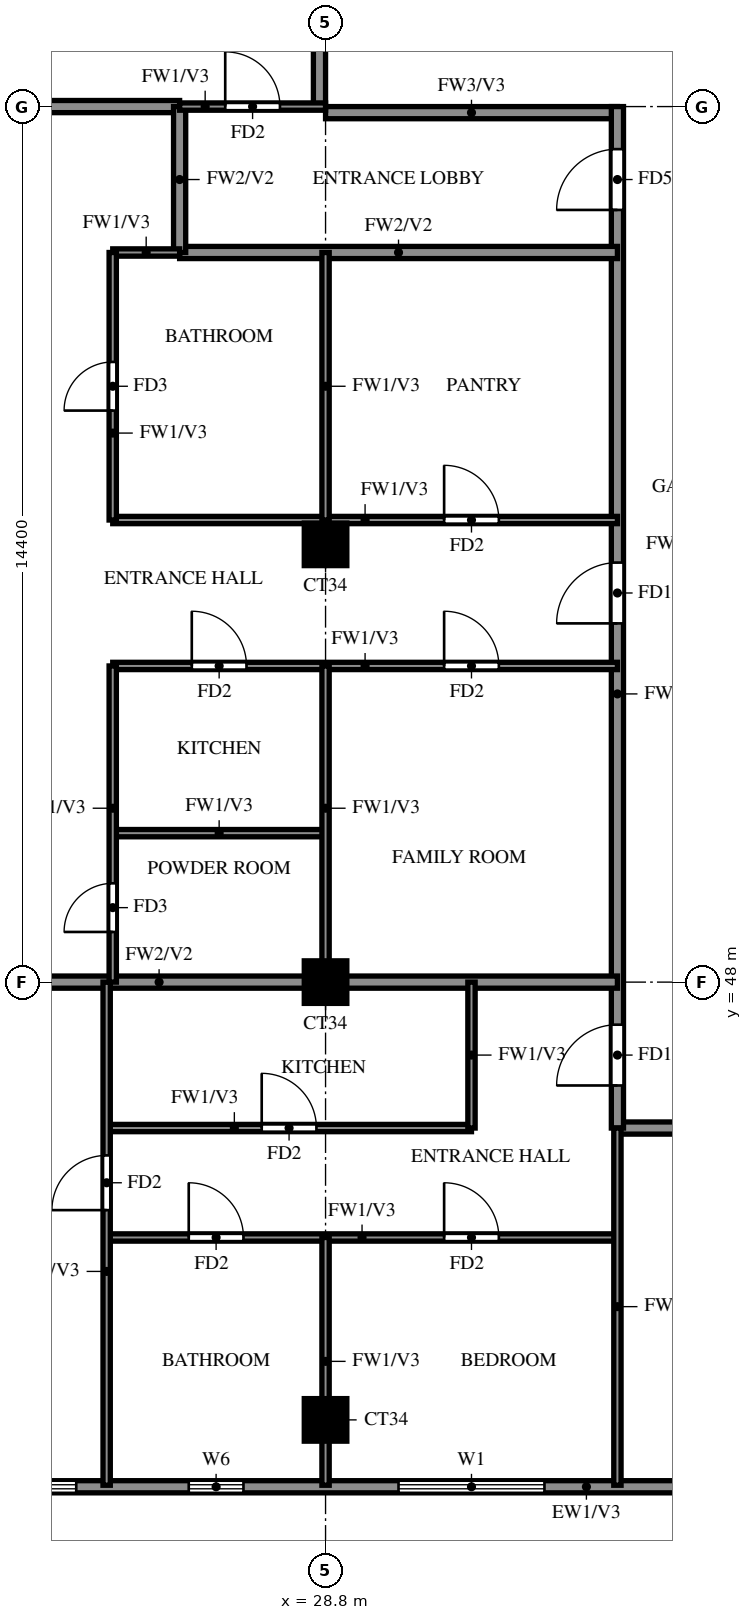
"""IFC4 building model, lengths in metres.
Left out: names, types, materials, properties, quantities, classifications, styles, units other than length and angle.
Written with IfcOpenShell. Run it as: python <this file> out.ifc"""

import sys

from ifc_helpers import new_model, si_unit, direction, frame, frame_2d, origin, origin_2d, place, context, subcontext, project, spatial, rectangle, extrude, source, transform, mapped, element, fill, save


model = new_model("IFC4")
c1 = context("Model", 3, precision=1e-05, world=origin(), true_north=direction((0.0, 1.0)))
c2 = subcontext(c1, "Body", "Model", "MODEL_VIEW")
j1 = project(units=[si_unit("LENGTHUNIT", "METRE"), si_unit("PLANEANGLEUNIT", "RADIAN")], contexts=[c1])
p1 = place(None, origin())
s1 = spatial("IfcSite", under=j1, at=p1, CompositionType="ELEMENT")
p2 = place(p1, origin())
s2 = spatial("IfcBuilding", under=s1, at=p2, CompositionType="ELEMENT")
p3 = place(p2, frame((0.0, 0.0, 264.0)))
s3 = spatial("IfcBuildingStorey", under=s2, at=p3, CompositionType="ELEMENT", Elevation=264.0)
m1 = source(origin(), c2, "Body", "SweptSolid", [
    extrude(rectangle(XDim=0.7, YDim=0.7, at=origin_2d()), origin(), (0.0, 0.0, 1.0), 3.22),
])
for number, where, z_axis, x_axis in (
    (1, (28.8, 40.8, 0.0), (0.0, 0.0, 1.0), (1.0, 0.0, 0.0)),
    (2, (28.8, 48.0, 0.0), (0.0, 0.0, 1.0), (1.0, 0.0, 0.0)),
    (3, (28.8, 55.2, 0.0), (0.0, 0.0, 1.0), (1.0, 0.0, 0.0)),
):
    element("IfcColumn", number, at=place(p3, frame(where, z_axis=z_axis, x_axis=x_axis)), inside=s3, PredefinedType="COLUMN", context=c2, shape_type="MappedRepresentation", body=[
        mapped(m1, transform((0.0, 0.0, 0.0))),
    ])
p4 = place(p3, frame((22.2, 39.7, 0.0), z_axis=(0.0, 0.0, 1.0), x_axis=(1.0, 0.0, 0.0)))
e4 = element("IfcWall", 4, at=p4, inside=s3, PredefinedType="SOLIDWALL", context=c2, shape_type="SweptSolid", body=[
    extrude(rectangle(XDim=19.8, YDim=0.2, at=frame_2d((9.9, 0.0))), origin(), (0.0, 0.0, 1.0), 3.22),
])
p5 = place(p4, frame((0.7, 0.0, 0.6)))
e5 = element("IfcOpeningElement", 5, at=p5, cuts=e4, PredefinedType="OPENING", context=c2, shape_type="SweptSolid", body=[
    extrude(rectangle(XDim=1.8, YDim=2.4, at=frame_2d((0.9, 1.2))), frame((0.0, 0.11, 0.0), z_axis=(0.0, -1.0, 0.0), x_axis=(1.0, 0.0, 0.0)), (0.0, 0.0, 1.0), 0.22),
])
p6 = place(p4, frame((4.35, 0.0, 1.5)))
e6 = element("IfcOpeningElement", 6, at=p6, cuts=e4, PredefinedType="OPENING", context=c2, shape_type="SweptSolid", body=[
    extrude(rectangle(XDim=0.9, YDim=0.9, at=frame_2d((0.45, 0.45))), frame((0.0, 0.11, 0.0), z_axis=(0.0, -1.0, 0.0), x_axis=(1.0, 0.0, 0.0)), (0.0, 0.0, 1.0), 0.22),
])
p7 = place(p4, frame((7.8, 0.0, 0.6)))
e7 = element("IfcOpeningElement", 7, at=p7, cuts=e4, PredefinedType="OPENING", context=c2, shape_type="SweptSolid", body=[
    extrude(rectangle(XDim=2.4, YDim=2.4, at=frame_2d((1.2, 1.2))), frame((0.0, 0.11, 0.0), z_axis=(0.0, -1.0, 0.0), x_axis=(1.0, 0.0, 0.0)), (0.0, 0.0, 1.0), 0.22),
])
p8 = place(p3, frame((33.6, 45.6, 0.0), z_axis=(0.0, 0.0, 1.0), x_axis=(1.0, 0.0, 0.0)))
e8 = element("IfcWall", 8, at=p8, inside=s3, PredefinedType="SOLIDWALL", context=c2, shape_type="SweptSolid", body=[
    extrude(rectangle(XDim=7.2, YDim=0.2, at=frame_2d((3.6, 0.0))), origin(), (0.0, 0.0, 1.0), 3.22),
])
p9 = place(p8, frame((3.15, 0.0, 0.0)))
e9 = element("IfcOpeningElement", 9, at=p9, cuts=e8, PredefinedType="OPENING", context=c2, shape_type="SweptSolid", body=[
    extrude(rectangle(XDim=0.9, YDim=2.1, at=frame_2d((0.45, 1.05))), frame((0.0, 0.11, 0.0), z_axis=(0.0, -1.0, 0.0), x_axis=(1.0, 0.0, 0.0)), (0.0, 0.0, 1.0), 0.22),
])
p10 = place(p3, frame((28.8, 62.3, 0.0), z_axis=(0.0, 0.0, 1.0), x_axis=(1.0, 0.0, 0.0)))
e10 = element("IfcWall", 10, at=p10, inside=s3, PredefinedType="SOLIDWALL", context=c2, shape_type="SweptSolid", body=[
    extrude(rectangle(XDim=4.8, YDim=0.2, at=frame_2d((2.4, 0.0))), origin(), (0.0, 0.0, 1.0), 3.22),
])
p11 = place(p3, frame((28.7, 62.4, 0.0), z_axis=(0.0, 0.0, 1.0), x_axis=(0.0, 1.0, 0.0)))
e11 = element("IfcWall", 11, at=p11, inside=s3, PredefinedType="SOLIDWALL", context=c2, shape_type="SweptSolid", body=[
    extrude(rectangle(XDim=15.6, YDim=0.2, at=frame_2d((7.8, 0.0))), origin(), (0.0, 0.0, 1.0), 3.22),
])
p12 = place(p3, frame((33.6, 45.6, 0.0), z_axis=(0.0, 0.0, 1.0), x_axis=(0.0, 1.0, 0.0)))
e12 = element("IfcWall", 12, at=p12, inside=s3, PredefinedType="SOLIDWALL", context=c2, shape_type="SweptSolid", body=[
    extrude(rectangle(XDim=16.8, YDim=0.2, at=frame_2d((8.4, 0.0))), origin(), (0.0, 0.0, 1.0), 3.22),
])
p13 = place(p12, frame((0.7, 0.0, 0.0)))
e13 = element("IfcOpeningElement", 13, at=p13, cuts=e12, PredefinedType="OPENING", context=c2, shape_type="SweptSolid", body=[
    extrude(rectangle(XDim=1.0, YDim=2.1, at=frame_2d((0.5, 1.05))), frame((0.0, 0.11, 0.0), z_axis=(0.0, -1.0, 0.0), x_axis=(1.0, 0.0, 0.0)), (0.0, 0.0, 1.0), 0.22),
])
p14 = place(p12, frame((8.3, 0.0, 0.0)))
e14 = element("IfcOpeningElement", 14, at=p14, cuts=e12, PredefinedType="OPENING", context=c2, shape_type="SweptSolid", body=[
    extrude(rectangle(XDim=1.0, YDim=2.1, at=frame_2d((0.5, 1.05))), frame((0.0, 0.11, 0.0), z_axis=(0.0, -1.0, 0.0), x_axis=(1.0, 0.0, 0.0)), (0.0, 0.0, 1.0), 0.22),
])
p15 = place(p12, frame((15.1, 0.0, 0.0)))
e15 = element("IfcOpeningElement", 15, at=p15, cuts=e12, PredefinedType="OPENING", context=c2, shape_type="SweptSolid", body=[
    extrude(rectangle(XDim=1.0, YDim=2.1, at=frame_2d((0.5, 1.05))), frame((0.0, 0.11, 0.0), z_axis=(0.0, -1.0, 0.0), x_axis=(1.0, 0.0, 0.0)), (0.0, 0.0, 1.0), 0.22),
])
p16 = place(p3, frame((18.525, 48.0, 0.0), z_axis=(0.0, 0.0, 1.0), x_axis=(1.0, 0.0, 0.0)))
e16 = element("IfcWall", 16, at=p16, inside=s3, PredefinedType="SOLIDWALL", context=c2, shape_type="SweptSolid", body=[
    extrude(rectangle(XDim=15.075, YDim=0.2, at=frame_2d((7.538, 0.0))), origin(), (0.0, 0.0, 1.0), 3.22),
])
p17 = place(p3, frame((26.4, 60.0, 0.0), z_axis=(0.0, 0.0, 1.0), x_axis=(1.0, 0.0, 0.0)))
e17 = element("IfcWall", 17, at=p17, inside=s3, PredefinedType="SOLIDWALL", context=c2, shape_type="SweptSolid", body=[
    extrude(rectangle(XDim=7.2, YDim=0.2, at=frame_2d((3.6, 0.0))), origin(), (0.0, 0.0, 1.0), 3.22),
])
p18 = place(p3, frame((18.525, 62.4, 0.0), z_axis=(0.0, 0.0, 1.0), x_axis=(1.0, 0.0, 0.0)))
e18 = element("IfcWall", 18, at=p18, inside=s3, PredefinedType="SOLIDWALL", context=c2, shape_type="SweptSolid", body=[
    extrude(rectangle(XDim=7.875, YDim=0.2, at=frame_2d((3.938, 0.0))), origin(), (0.0, 0.0, 1.0), 3.22),
])
p19 = place(p3, frame((26.4, 60.0, 0.0), z_axis=(0.0, 0.0, 1.0), x_axis=(0.0, 1.0, 0.0)))
e19 = element("IfcWall", 19, at=p19, inside=s3, PredefinedType="SOLIDWALL", context=c2, shape_type="SweptSolid", body=[
    extrude(rectangle(XDim=2.4, YDim=0.2, at=frame_2d((1.2, 0.0))), origin(), (0.0, 0.0, 1.0), 3.22),
])
p20 = place(p3, frame((25.2, 43.8, 0.0), z_axis=(0.0, 0.0, 1.0), x_axis=(1.0, 0.0, 0.0)))
e20 = element("IfcWall", 20, at=p20, inside=s3, PredefinedType="PARTITIONING", context=c2, shape_type="SweptSolid", body=[
    extrude(rectangle(XDim=8.4, YDim=0.12, at=frame_2d((4.2, 0.0))), origin(), (0.0, 0.0, 1.0), 3.22),
])
p21 = place(p20, frame((1.35, 0.0, 0.0)))
e21 = element("IfcOpeningElement", 21, at=p21, cuts=e20, PredefinedType="OPENING", context=c2, shape_type="SweptSolid", body=[
    extrude(rectangle(XDim=0.9, YDim=2.1, at=frame_2d((0.45, 1.05))), frame((0.0, 0.07, 0.0), z_axis=(0.0, -1.0, 0.0), x_axis=(1.0, 0.0, 0.0)), (0.0, 0.0, 1.0), 0.14),
])
p22 = place(p20, frame((5.55, 0.0, 0.0)))
e22 = element("IfcOpeningElement", 22, at=p22, cuts=e20, PredefinedType="OPENING", context=c2, shape_type="SweptSolid", body=[
    extrude(rectangle(XDim=0.9, YDim=2.1, at=frame_2d((0.45, 1.05))), frame((0.0, 0.07, 0.0), z_axis=(0.0, -1.0, 0.0), x_axis=(1.0, 0.0, 0.0)), (0.0, 0.0, 1.0), 0.14),
])
p23 = place(p3, frame((25.2, 45.6, 0.0), z_axis=(0.0, 0.0, 1.0), x_axis=(1.0, 0.0, 0.0)))
e23 = element("IfcWall", 23, at=p23, inside=s3, PredefinedType="PARTITIONING", context=c2, shape_type="SweptSolid", body=[
    extrude(rectangle(XDim=6.0, YDim=0.12, at=frame_2d((3.0, 0.0))), origin(), (0.0, 0.0, 1.0), 3.22),
])
p24 = place(p23, frame((2.55, 0.0, 0.0)))
e24 = element("IfcOpeningElement", 24, at=p24, cuts=e23, PredefinedType="OPENING", context=c2, shape_type="SweptSolid", body=[
    extrude(rectangle(XDim=0.9, YDim=2.1, at=frame_2d((0.45, 1.05))), frame((0.0, 0.07, 0.0), z_axis=(0.0, -1.0, 0.0), x_axis=(1.0, 0.0, 0.0)), (0.0, 0.0, 1.0), 0.14),
])
p25 = place(p3, frame((25.3, 50.45, 0.0), z_axis=(0.0, 0.0, 1.0), x_axis=(1.0, 0.0, 0.0)))
e25 = element("IfcWall", 25, at=p25, inside=s3, PredefinedType="PARTITIONING", context=c2, shape_type="SweptSolid", body=[
    extrude(rectangle(XDim=3.5, YDim=0.12, at=frame_2d((1.75, 0.0))), origin(), (0.0, 0.0, 1.0), 3.22),
])
p26 = place(p3, frame((25.3, 53.2, 0.0), z_axis=(0.0, 0.0, 1.0), x_axis=(1.0, 0.0, 0.0)))
e26 = element("IfcWall", 26, at=p26, inside=s3, PredefinedType="PARTITIONING", context=c2, shape_type="SweptSolid", body=[
    extrude(rectangle(XDim=8.3, YDim=0.12, at=frame_2d((4.15, 0.0))), origin(), (0.0, 0.0, 1.0), 3.22),
])
p27 = place(p26, frame((1.3, 0.0, 0.0)))
e27 = element("IfcOpeningElement", 27, at=p27, cuts=e26, PredefinedType="OPENING", context=c2, shape_type="SweptSolid", body=[
    extrude(rectangle(XDim=0.9, YDim=2.1, at=frame_2d((0.45, 1.05))), frame((0.0, 0.07, 0.0), z_axis=(0.0, -1.0, 0.0), x_axis=(1.0, 0.0, 0.0)), (0.0, 0.0, 1.0), 0.14),
])
p28 = place(p26, frame((5.45, 0.0, 0.0)))
e28 = element("IfcOpeningElement", 28, at=p28, cuts=e26, PredefinedType="OPENING", context=c2, shape_type="SweptSolid", body=[
    extrude(rectangle(XDim=0.9, YDim=2.1, at=frame_2d((0.45, 1.05))), frame((0.0, 0.07, 0.0), z_axis=(0.0, -1.0, 0.0), x_axis=(1.0, 0.0, 0.0)), (0.0, 0.0, 1.0), 0.14),
])
p29 = place(p3, frame((25.3, 55.6, 0.0), z_axis=(0.0, 0.0, 1.0), x_axis=(1.0, 0.0, 0.0)))
e29 = element("IfcWall", 29, at=p29, inside=s3, PredefinedType="PARTITIONING", context=c2, shape_type="SweptSolid", body=[
    extrude(rectangle(XDim=8.3, YDim=0.12, at=frame_2d((4.15, 0.0))), origin(), (0.0, 0.0, 1.0), 3.22),
])
p30 = place(p29, frame((5.45, 0.0, 0.0)))
e30 = element("IfcOpeningElement", 30, at=p30, cuts=e29, PredefinedType="OPENING", context=c2, shape_type="SweptSolid", body=[
    extrude(rectangle(XDim=0.9, YDim=2.1, at=frame_2d((0.45, 1.05))), frame((0.0, 0.07, 0.0), z_axis=(0.0, -1.0, 0.0), x_axis=(1.0, 0.0, 0.0)), (0.0, 0.0, 1.0), 0.14),
])
p31 = place(p3, frame((25.3, 60.0, 0.0), z_axis=(0.0, 0.0, 1.0), x_axis=(1.0, 0.0, 0.0)))
e31 = element("IfcWall", 31, at=p31, inside=s3, PredefinedType="PARTITIONING", context=c2, shape_type="SweptSolid", body=[
    extrude(rectangle(XDim=1.1, YDim=0.12, at=frame_2d((0.55, 0.0))), origin(), (0.0, 0.0, 1.0), 3.22),
])
p32 = place(p3, frame((26.4, 62.4, 0.0), z_axis=(0.0, 0.0, 1.0), x_axis=(1.0, 0.0, 0.0)))
e32 = element("IfcWall", 32, at=p32, inside=s3, PredefinedType="PARTITIONING", context=c2, shape_type="SweptSolid", body=[
    extrude(rectangle(XDim=2.4, YDim=0.12, at=frame_2d((1.2, 0.0))), origin(), (0.0, 0.0, 1.0), 3.22),
])
p33 = place(p32, frame((0.75, 0.0, 0.0)))
e33 = element("IfcOpeningElement", 33, at=p33, cuts=e32, PredefinedType="OPENING", context=c2, shape_type="SweptSolid", body=[
    extrude(rectangle(XDim=0.9, YDim=2.1, at=frame_2d((0.45, 1.05))), frame((0.0, 0.07, 0.0), z_axis=(0.0, -1.0, 0.0), x_axis=(1.0, 0.0, 0.0)), (0.0, 0.0, 1.0), 0.14),
])
p34 = place(p3, frame((25.2, 39.725, 0.0), z_axis=(0.0, 0.0, 1.0), x_axis=(0.0, 1.0, 0.0)))
e34 = element("IfcWall", 34, at=p34, inside=s3, PredefinedType="PARTITIONING", context=c2, shape_type="SweptSolid", body=[
    extrude(rectangle(XDim=8.275, YDim=0.12, at=frame_2d((4.137, 0.0))), origin(), (0.0, 0.0, 1.0), 3.22),
])
p35 = place(p34, frame((4.525, 0.0, 0.0)))
e35 = element("IfcOpeningElement", 35, at=p35, cuts=e34, PredefinedType="OPENING", context=c2, shape_type="SweptSolid", body=[
    extrude(rectangle(XDim=0.9, YDim=2.1, at=frame_2d((0.45, 1.05))), frame((0.0, 0.07, 0.0), z_axis=(0.0, -1.0, 0.0), x_axis=(1.0, 0.0, 0.0)), (0.0, 0.0, 1.0), 0.14),
])
p36 = place(p3, frame((25.3, 48.0, 0.0), z_axis=(0.0, 0.0, 1.0), x_axis=(0.0, 1.0, 0.0)))
e36 = element("IfcWall", 36, at=p36, inside=s3, PredefinedType="PARTITIONING", context=c2, shape_type="SweptSolid", body=[
    extrude(rectangle(XDim=5.2, YDim=0.12, at=frame_2d((2.6, 0.0))), origin(), (0.0, 0.0, 1.0), 3.22),
])
p37 = place(p36, frame((0.825, 0.0, 0.0)))
e37 = element("IfcOpeningElement", 37, at=p37, cuts=e36, PredefinedType="OPENING", context=c2, shape_type="SweptSolid", body=[
    extrude(rectangle(XDim=0.8, YDim=2.1, at=frame_2d((0.4, 1.05))), frame((0.0, 0.07, 0.0), z_axis=(0.0, -1.0, 0.0), x_axis=(1.0, 0.0, 0.0)), (0.0, 0.0, 1.0), 0.14),
])
p38 = place(p3, frame((25.3, 55.6, 0.0), z_axis=(0.0, 0.0, 1.0), x_axis=(0.0, 1.0, 0.0)))
e38 = element("IfcWall", 38, at=p38, inside=s3, PredefinedType="PARTITIONING", context=c2, shape_type="SweptSolid", body=[
    extrude(rectangle(XDim=4.4, YDim=0.12, at=frame_2d((2.2, 0.0))), origin(), (0.0, 0.0, 1.0), 3.22),
])
p39 = place(p38, frame((1.8, 0.0, 0.0)))
e39 = element("IfcOpeningElement", 39, at=p39, cuts=e38, PredefinedType="OPENING", context=c2, shape_type="SweptSolid", body=[
    extrude(rectangle(XDim=0.8, YDim=2.1, at=frame_2d((0.4, 1.05))), frame((0.0, 0.07, 0.0), z_axis=(0.0, -1.0, 0.0), x_axis=(1.0, 0.0, 0.0)), (0.0, 0.0, 1.0), 0.14),
])
p40 = place(p3, frame((28.8, 39.725, 0.0), z_axis=(0.0, 0.0, 1.0), x_axis=(0.0, 1.0, 0.0)))
e40 = element("IfcWall", 40, at=p40, inside=s3, PredefinedType="PARTITIONING", context=c2, shape_type="SweptSolid", body=[
    extrude(rectangle(XDim=4.075, YDim=0.12, at=frame_2d((2.038, 0.0))), origin(), (0.0, 0.0, 1.0), 3.22),
])
p41 = place(p3, frame((28.8, 48.0, 0.0), z_axis=(0.0, 0.0, 1.0), x_axis=(0.0, 1.0, 0.0)))
e41 = element("IfcWall", 41, at=p41, inside=s3, PredefinedType="PARTITIONING", context=c2, shape_type="SweptSolid", body=[
    extrude(rectangle(XDim=5.2, YDim=0.12, at=frame_2d((2.6, 0.0))), origin(), (0.0, 0.0, 1.0), 3.22),
])
p42 = place(p3, frame((28.8, 55.6, 0.0), z_axis=(0.0, 0.0, 1.0), x_axis=(0.0, 1.0, 0.0)))
e42 = element("IfcWall", 42, at=p42, inside=s3, PredefinedType="PARTITIONING", context=c2, shape_type="SweptSolid", body=[
    extrude(rectangle(XDim=4.4, YDim=0.12, at=frame_2d((2.2, 0.0))), origin(), (0.0, 0.0, 1.0), 3.22),
])
p43 = place(p3, frame((31.2, 45.6, 0.0), z_axis=(0.0, 0.0, 1.0), x_axis=(0.0, 1.0, 0.0)))
e43 = element("IfcWall", 43, at=p43, inside=s3, PredefinedType="PARTITIONING", context=c2, shape_type="SweptSolid", body=[
    extrude(rectangle(XDim=2.4, YDim=0.12, at=frame_2d((1.2, 0.0))), origin(), (0.0, 0.0, 1.0), 3.22),
])
p44 = place(p3, frame((33.6, 39.725, 0.0), z_axis=(0.0, 0.0, 1.0), x_axis=(0.0, 1.0, 0.0)))
e44 = element("IfcWall", 44, at=p44, inside=s3, PredefinedType="PARTITIONING", context=c2, shape_type="SweptSolid", body=[
    extrude(rectangle(XDim=5.875, YDim=0.12, at=frame_2d((2.938, 0.0))), origin(), (0.0, 0.0, 1.0), 3.22),
])
p45 = place(p5, origin())
e45 = element("IfcWindow", 45, at=p45, inside=s3, PartitioningType="DOUBLE_PANEL_VERTICAL", PredefinedType="WINDOW", context=c2, shape_type="SweptSolid", body=[
    extrude(rectangle(XDim=1.8, YDim=2.4, at=frame_2d((0.9, 1.2))), frame((0.0, 0.03, 0.0), z_axis=(0.0, -1.0, 0.0), x_axis=(1.0, 0.0, 0.0)), (0.0, 0.0, 1.0), 0.06),
])
fill(e5, e45)
p46 = place(p6, origin())
e46 = element("IfcWindow", 46, at=p46, inside=s3, PartitioningType="SINGLE_PANEL", PredefinedType="WINDOW", context=c2, shape_type="SweptSolid", body=[
    extrude(rectangle(XDim=0.9, YDim=0.9, at=frame_2d((0.45, 0.45))), frame((0.0, 0.03, 0.0), z_axis=(0.0, -1.0, 0.0), x_axis=(1.0, 0.0, 0.0)), (0.0, 0.0, 1.0), 0.06),
])
fill(e6, e46)
p47 = place(p7, origin())
e47 = element("IfcWindow", 47, at=p47, inside=s3, PartitioningType="DOUBLE_PANEL_VERTICAL", PredefinedType="WINDOW", context=c2, shape_type="SweptSolid", body=[
    extrude(rectangle(XDim=2.4, YDim=2.4, at=frame_2d((1.2, 1.2))), frame((0.0, 0.03, 0.0), z_axis=(0.0, -1.0, 0.0), x_axis=(1.0, 0.0, 0.0)), (0.0, 0.0, 1.0), 0.06),
])
fill(e7, e47)
p48 = place(p13, origin())
e48 = element("IfcDoor", 48, at=p48, inside=s3, OperationType="SINGLE_SWING_LEFT", PredefinedType="DOOR", context=c2, shape_type="SweptSolid", body=[
    extrude(rectangle(XDim=1.0, YDim=2.1, at=frame_2d((0.5, 1.05))), frame((0.0, 0.025, 0.0), z_axis=(0.0, -1.0, 0.0), x_axis=(1.0, 0.0, 0.0)), (0.0, 0.0, 1.0), 0.05),
])
fill(e13, e48)
p49 = place(p35, origin())
e49 = element("IfcDoor", 49, at=p49, inside=s3, OperationType="SINGLE_SWING_RIGHT", PredefinedType="DOOR", context=c2, shape_type="SweptSolid", body=[
    extrude(rectangle(XDim=0.9, YDim=2.1, at=frame_2d((0.45, 1.05))), frame((0.0, 0.025, 0.0), z_axis=(0.0, -1.0, 0.0), x_axis=(1.0, 0.0, 0.0)), (0.0, 0.0, 1.0), 0.05),
])
fill(e35, e49)
p50 = place(p21, origin())
e50 = element("IfcDoor", 50, at=p50, inside=s3, OperationType="SINGLE_SWING_LEFT", PredefinedType="DOOR", context=c2, shape_type="SweptSolid", body=[
    extrude(rectangle(XDim=0.9, YDim=2.1, at=frame_2d((0.45, 1.05))), frame((0.0, 0.025, 0.0), z_axis=(0.0, -1.0, 0.0), x_axis=(1.0, 0.0, 0.0)), (0.0, 0.0, 1.0), 0.05),
])
fill(e21, e50)
p51 = place(p22, origin())
e51 = element("IfcDoor", 51, at=p51, inside=s3, OperationType="SINGLE_SWING_LEFT", PredefinedType="DOOR", context=c2, shape_type="SweptSolid", body=[
    extrude(rectangle(XDim=0.9, YDim=2.1, at=frame_2d((0.45, 1.05))), frame((0.0, 0.025, 0.0), z_axis=(0.0, -1.0, 0.0), x_axis=(1.0, 0.0, 0.0)), (0.0, 0.0, 1.0), 0.05),
])
fill(e22, e51)
p52 = place(p24, origin())
e52 = element("IfcDoor", 52, at=p52, inside=s3, OperationType="SINGLE_SWING_RIGHT", PredefinedType="DOOR", context=c2, shape_type="SweptSolid", body=[
    extrude(rectangle(XDim=0.9, YDim=2.1, at=frame_2d((0.45, 1.05))), frame((0.0, 0.025, 0.0), z_axis=(0.0, -1.0, 0.0), x_axis=(1.0, 0.0, 0.0)), (0.0, 0.0, 1.0), 0.05),
])
fill(e24, e52)
p53 = place(p14, origin())
e53 = element("IfcDoor", 53, at=p53, inside=s3, OperationType="SINGLE_SWING_LEFT", PredefinedType="DOOR", context=c2, shape_type="SweptSolid", body=[
    extrude(rectangle(XDim=1.0, YDim=2.1, at=frame_2d((0.5, 1.05))), frame((0.0, 0.025, 0.0), z_axis=(0.0, -1.0, 0.0), x_axis=(1.0, 0.0, 0.0)), (0.0, 0.0, 1.0), 0.05),
])
fill(e14, e53)
p54 = place(p37, origin())
e54 = element("IfcDoor", 54, at=p54, inside=s3, OperationType="SINGLE_SWING_RIGHT", PredefinedType="DOOR", context=c2, shape_type="SweptSolid", body=[
    extrude(rectangle(XDim=0.8, YDim=2.1, at=frame_2d((0.4, 1.05))), frame((0.0, 0.025, 0.0), z_axis=(0.0, -1.0, 0.0), x_axis=(1.0, 0.0, 0.0)), (0.0, 0.0, 1.0), 0.05),
])
fill(e37, e54)
p55 = place(p27, origin())
e55 = element("IfcDoor", 55, at=p55, inside=s3, OperationType="SINGLE_SWING_LEFT", PredefinedType="DOOR", context=c2, shape_type="SweptSolid", body=[
    extrude(rectangle(XDim=0.9, YDim=2.1, at=frame_2d((0.45, 1.05))), frame((0.0, 0.025, 0.0), z_axis=(0.0, -1.0, 0.0), x_axis=(1.0, 0.0, 0.0)), (0.0, 0.0, 1.0), 0.05),
])
fill(e27, e55)
p56 = place(p39, origin())
e56 = element("IfcDoor", 56, at=p56, inside=s3, OperationType="SINGLE_SWING_LEFT", PredefinedType="DOOR", context=c2, shape_type="SweptSolid", body=[
    extrude(rectangle(XDim=0.8, YDim=2.1, at=frame_2d((0.4, 1.05))), frame((0.0, 0.025, 0.0), z_axis=(0.0, -1.0, 0.0), x_axis=(1.0, 0.0, 0.0)), (0.0, 0.0, 1.0), 0.05),
])
fill(e39, e56)
p57 = place(p28, origin())
e57 = element("IfcDoor", 57, at=p57, inside=s3, OperationType="SINGLE_SWING_RIGHT", PredefinedType="DOOR", context=c2, shape_type="SweptSolid", body=[
    extrude(rectangle(XDim=0.9, YDim=2.1, at=frame_2d((0.45, 1.05))), frame((0.0, 0.025, 0.0), z_axis=(0.0, -1.0, 0.0), x_axis=(1.0, 0.0, 0.0)), (0.0, 0.0, 1.0), 0.05),
])
fill(e28, e57)
p58 = place(p30, origin())
e58 = element("IfcDoor", 58, at=p58, inside=s3, OperationType="SINGLE_SWING_LEFT", PredefinedType="DOOR", context=c2, shape_type="SweptSolid", body=[
    extrude(rectangle(XDim=0.9, YDim=2.1, at=frame_2d((0.45, 1.05))), frame((0.0, 0.025, 0.0), z_axis=(0.0, -1.0, 0.0), x_axis=(1.0, 0.0, 0.0)), (0.0, 0.0, 1.0), 0.05),
])
fill(e30, e58)
p59 = place(p33, origin())
e59 = element("IfcDoor", 59, at=p59, inside=s3, OperationType="SINGLE_SWING_LEFT", PredefinedType="DOOR", context=c2, shape_type="SweptSolid", body=[
    extrude(rectangle(XDim=0.9, YDim=2.1, at=frame_2d((0.45, 1.05))), frame((0.0, 0.025, 0.0), z_axis=(0.0, -1.0, 0.0), x_axis=(1.0, 0.0, 0.0)), (0.0, 0.0, 1.0), 0.05),
])
fill(e33, e59)
p60 = place(p15, origin())
e60 = element("IfcDoor", 60, at=p60, inside=s3, OperationType="SINGLE_SWING_RIGHT", PredefinedType="DOOR", context=c2, shape_type="SweptSolid", body=[
    extrude(rectangle(XDim=1.0, YDim=2.1, at=frame_2d((0.5, 1.05))), frame((0.0, 0.025, 0.0), z_axis=(0.0, -1.0, 0.0), x_axis=(1.0, 0.0, 0.0)), (0.0, 0.0, 1.0), 0.05),
])
fill(e15, e60)
save(model, sys.argv[1])
